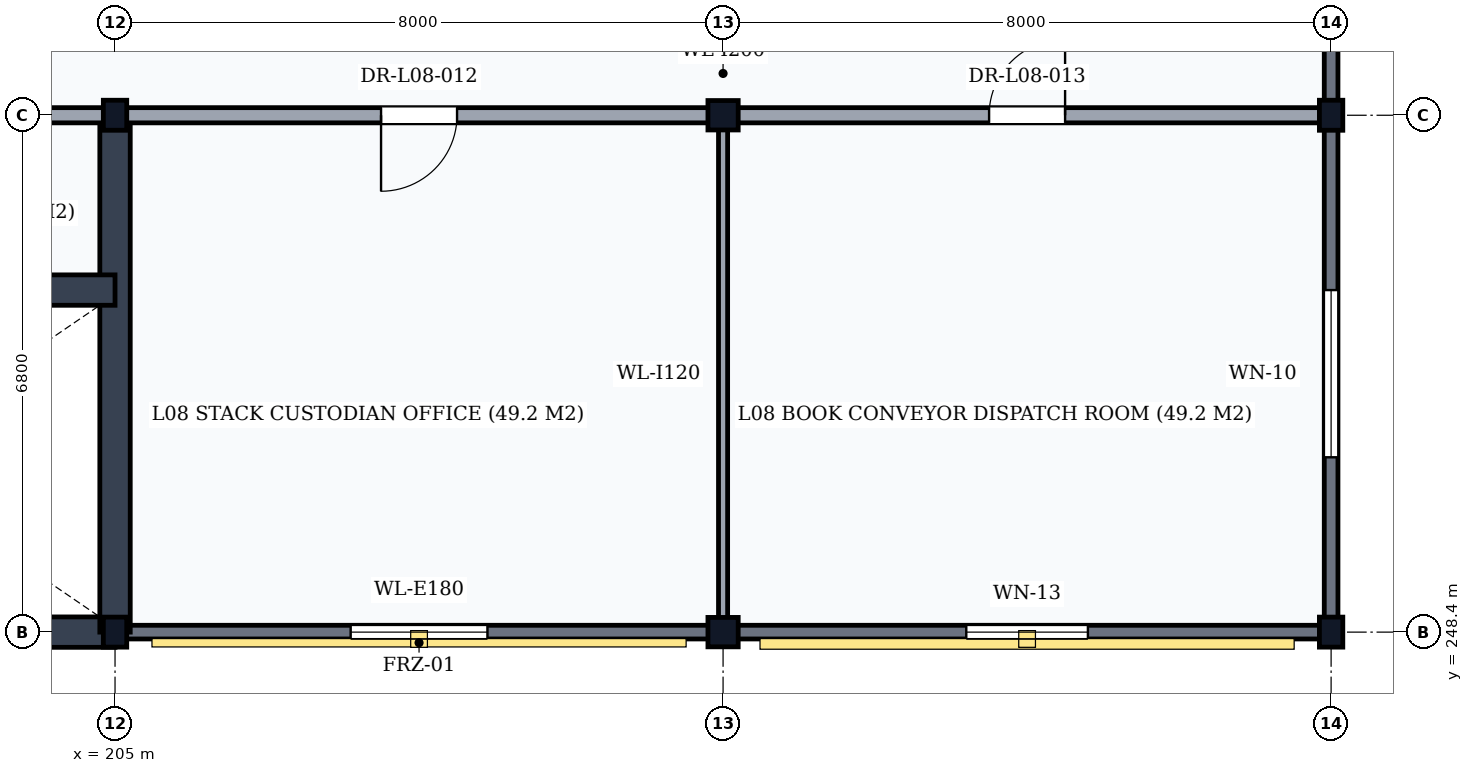
"""IFC4 building model, lengths in metres.
Left out: names, types, materials, properties, quantities, classifications, styles, units other than length and angle.
Written with IfcOpenShell. Run it as: python <this file> out.ifc"""

import sys

from ifc_helpers import new_model, si_unit, direction, frame, frame_2d, origin, origin_2d, place, context, subcontext, project, spatial, rectangle, i_section, extrude, element, fill, save


model = new_model("IFC4")
c1 = context("Model", 3, precision=1e-05, world=origin(), true_north=direction((0.0, 1.0)))
c2 = subcontext(c1, "Body", "Model", "MODEL_VIEW")
j1 = project(units=[si_unit("LENGTHUNIT", "METRE"), si_unit("PLANEANGLEUNIT", "RADIAN")], contexts=[c1])
p1 = place(None, origin())
s1 = spatial("IfcSite", under=j1, at=p1, CompositionType="ELEMENT")
p2 = place(p1, origin())
s2 = spatial("IfcBuilding", under=s1, at=p2, CompositionType="ELEMENT")
p3 = place(p2, frame((0.0, 0.0, 32.1)))
s3 = spatial("IfcBuildingStorey", under=s2, at=p3, CompositionType="ELEMENT", Elevation=32.1)
for number, where, z_axis, x_axis in (
    (1, (205.0, 248.4, 0.0), (0.0, 0.0, 1.0), (1.0, 0.0, 0.0)),
    (2, (205.0, 255.2, 0.0), (0.0, 0.0, 1.0), (1.0, 0.0, 0.0)),
):
    element("IfcColumn", number, at=place(p3, frame(where, z_axis=z_axis, x_axis=x_axis)), inside=s3, PredefinedType="COLUMN", context=c2, shape_type="SweptSolid", body=[
        extrude(i_section(OverallWidth=0.308, OverallDepth=0.395, WebThickness=0.021, FlangeThickness=0.04, FilletRadius=0.027, at=origin_2d()), origin(), (0.0, 0.0, 1.0), 3.9),
    ])
for number, where, z_axis, x_axis in (
    (3, (213.0, 248.4, 0.0), (0.0, 0.0, 1.0), (1.0, 0.0, 0.0)),
    (4, (213.0, 255.2, 0.0), (0.0, 0.0, 1.0), (1.0, 0.0, 0.0)),
):
    element("IfcColumn", number, at=place(p3, frame(where, z_axis=z_axis, x_axis=x_axis)), inside=s3, PredefinedType="COLUMN", context=c2, shape_type="SweptSolid", body=[
        extrude(i_section(OverallWidth=0.398, OverallDepth=0.387, WebThickness=0.021, FlangeThickness=0.033, FilletRadius=0.015, at=origin_2d()), origin(), (0.0, 0.0, 1.0), 3.9),
    ])
for number, where, z_axis, x_axis in (
    (5, (221.0, 248.4, 0.0), (0.0, 0.0, 1.0), (1.0, 0.0, 0.0)),
    (6, (221.0, 255.2, 0.0), (0.0, 0.0, 1.0), (1.0, 0.0, 0.0)),
):
    element("IfcColumn", number, at=place(p3, frame(where, z_axis=z_axis, x_axis=x_axis)), inside=s3, PredefinedType="COLUMN", context=c2, shape_type="SweptSolid", body=[
        extrude(i_section(OverallWidth=0.308, OverallDepth=0.395, WebThickness=0.021, FlangeThickness=0.04, FilletRadius=0.027, at=origin_2d()), origin(), (0.0, 0.0, 1.0), 3.9),
    ])
p4 = place(p3, frame((205.006, 248.4, 0.0), z_axis=(0.0, 0.0, 1.0), x_axis=(1.0, 0.0, 0.0)))
e7 = element("IfcWall", 7, at=p4, inside=s3, PredefinedType="SOLIDWALL", context=c2, shape_type="SweptSolid", body=[
    extrude(rectangle(XDim=7.988, YDim=0.18, at=frame_2d((3.994, 0.0))), origin(), (0.0, 0.0, 1.0), 3.368),
])
p5 = place(p4, frame((3.094, 0.0, 0.95)))
e8 = element("IfcOpeningElement", 8, at=p5, cuts=e7, PredefinedType="OPENING", context=c2, shape_type="SweptSolid", body=[
    extrude(rectangle(XDim=1.8, YDim=2.0, at=frame_2d((0.9, 1.0))), frame((0.0, 0.105, 0.0), z_axis=(0.0, -1.0, 0.0), x_axis=(1.0, 0.0, 0.0)), (0.0, 0.0, 1.0), 0.21),
])
p6 = place(p3, frame((213.006, 248.4, 0.0), z_axis=(0.0, 0.0, 1.0), x_axis=(1.0, 0.0, 0.0)))
e9 = element("IfcWall", 9, at=p6, inside=s3, PredefinedType="SOLIDWALL", context=c2, shape_type="SweptSolid", body=[
    extrude(rectangle(XDim=7.988, YDim=0.18, at=frame_2d((3.994, 0.0))), origin(), (0.0, 0.0, 1.0), 3.368),
])
p7 = place(p6, frame((3.194, 0.0, 0.95)))
e10 = element("IfcOpeningElement", 10, at=p7, cuts=e9, PredefinedType="OPENING", context=c2, shape_type="SweptSolid", body=[
    extrude(rectangle(XDim=1.6, YDim=2.0, at=frame_2d((0.8, 1.0))), frame((0.0, 0.105, 0.0), z_axis=(0.0, -1.0, 0.0), x_axis=(1.0, 0.0, 0.0)), (0.0, 0.0, 1.0), 0.21),
])
p8 = place(p3, frame((221.0, 248.406, 0.0), z_axis=(0.0, 0.0, 1.0), x_axis=(0.0, 1.0, 0.0)))
e11 = element("IfcWall", 11, at=p8, inside=s3, PredefinedType="SOLIDWALL", context=c2, shape_type="SweptSolid", body=[
    extrude(rectangle(XDim=6.788, YDim=0.18, at=frame_2d((3.394, 0.0))), origin(), (0.0, 0.0, 1.0), 3.448),
])
p9 = place(p8, frame((2.294, 0.0, 0.95)))
e12 = element("IfcOpeningElement", 12, at=p9, cuts=e11, PredefinedType="OPENING", context=c2, shape_type="SweptSolid", body=[
    extrude(rectangle(XDim=2.2, YDim=2.1, at=frame_2d((1.1, 1.05))), frame((0.0, 0.105, 0.0), z_axis=(0.0, -1.0, 0.0), x_axis=(1.0, 0.0, 0.0)), (0.0, 0.0, 1.0), 0.21),
])
p10 = place(p3, frame((221.0, 255.206, 0.0), z_axis=(0.0, 0.0, 1.0), x_axis=(0.0, 1.0, 0.0)))
e13 = element("IfcWall", 13, at=p10, inside=s3, PredefinedType="SOLIDWALL", context=c2, shape_type="SweptSolid", body=[
    extrude(rectangle(XDim=7.588, YDim=0.18, at=frame_2d((3.794, 0.0))), origin(), (0.0, 0.0, 1.0), 3.408),
])
p11 = place(p10, frame((4.066, 0.0, 0.95)))
e14 = element("IfcOpeningElement", 14, at=p11, cuts=e13, PredefinedType="OPENING", context=c2, shape_type="SweptSolid", body=[
    extrude(rectangle(XDim=2.0, YDim=2.1, at=frame_2d((1.0, 1.05))), frame((0.0, 0.105, 0.0), z_axis=(0.0, -1.0, 0.0), x_axis=(1.0, 0.0, 0.0)), (0.0, 0.0, 1.0), 0.21),
])
p12 = place(p3, frame((197.0, 248.4, 0.0), z_axis=(0.0, 0.0, 1.0), x_axis=(1.0, 0.0, 0.0)))
e15 = element("IfcWall", 15, at=p12, inside=s3, PredefinedType="SHEAR", context=c2, shape_type="SweptSolid", body=[
    extrude(rectangle(XDim=8.0, YDim=0.4, at=frame_2d((4.0, 0.0))), origin(), (0.0, 0.0, 1.0), 3.68),
])
p13 = place(p3, frame((205.0, 248.4, 0.0), z_axis=(0.0, 0.0, 1.0), x_axis=(0.0, 1.0, 0.0)))
e16 = element("IfcWall", 16, at=p13, inside=s3, PredefinedType="SHEAR", context=c2, shape_type="SweptSolid", body=[
    extrude(rectangle(XDim=6.8, YDim=0.4, at=frame_2d((3.4, 0.0))), origin(), (0.0, 0.0, 1.0), 3.68),
])
p14 = place(p3, frame((197.0, 252.9, 0.0), z_axis=(0.0, 0.0, 1.0), x_axis=(1.0, 0.0, 0.0)))
e17 = element("IfcWall", 17, at=p14, inside=s3, PredefinedType="SHEAR", context=c2, shape_type="SweptSolid", body=[
    extrude(rectangle(XDim=8.0, YDim=0.4, at=frame_2d((4.0, 0.0))), origin(), (0.0, 0.0, 1.0), 3.68),
])
p15 = place(p14, frame((0.3, 0.0, 0.0)))
e18 = element("IfcOpeningElement", 18, at=p15, cuts=e17, PredefinedType="OPENING", context=c2, shape_type="SweptSolid", body=[
    extrude(rectangle(XDim=1.15, YDim=2.15, at=frame_2d((0.575, 1.075))), frame((0.0, 0.215, 0.0), z_axis=(0.0, -1.0, 0.0), x_axis=(1.0, 0.0, 0.0)), (0.0, 0.0, 1.0), 0.43),
])
p16 = place(p3, frame((197.0, 255.2, 0.0), z_axis=(0.0, 0.0, 1.0), x_axis=(1.0, 0.0, 0.0)))
e19 = element("IfcWall", 19, at=p16, inside=s3, PredefinedType="PARTITIONING", context=c2, shape_type="SweptSolid", body=[
    extrude(rectangle(XDim=8.0, YDim=0.2, at=frame_2d((4.0, 0.0))), origin(), (0.0, 0.0, 1.0), 3.078),
])
p17 = place(p16, frame((3.275, 0.0, 0.0)))
e20 = element("IfcOpeningElement", 20, at=p17, cuts=e19, PredefinedType="OPENING", context=c2, shape_type="SweptSolid", body=[
    extrude(rectangle(XDim=1.45, YDim=2.2, at=frame_2d((0.725, 1.1))), frame((0.0, 0.115, 0.0), z_axis=(0.0, -1.0, 0.0), x_axis=(1.0, 0.0, 0.0)), (0.0, 0.0, 1.0), 0.23),
])
p18 = place(p3, frame((205.0, 255.2, 0.0), z_axis=(0.0, 0.0, 1.0), x_axis=(1.0, 0.0, 0.0)))
e21 = element("IfcWall", 21, at=p18, inside=s3, PredefinedType="PARTITIONING", context=c2, shape_type="SweptSolid", body=[
    extrude(rectangle(XDim=16.0, YDim=0.2, at=frame_2d((8.0, 0.0))), origin(), (0.0, 0.0, 1.0), 3.078),
])
p19 = place(p18, frame((3.5, 0.0, 0.0)))
e22 = element("IfcOpeningElement", 22, at=p19, cuts=e21, PredefinedType="OPENING", context=c2, shape_type="SweptSolid", body=[
    extrude(rectangle(XDim=1.0, YDim=2.1, at=frame_2d((0.5, 1.05))), frame((0.0, 0.115, 0.0), z_axis=(0.0, -1.0, 0.0), x_axis=(1.0, 0.0, 0.0)), (0.0, 0.0, 1.0), 0.23),
])
p20 = place(p18, frame((11.5, 0.0, 0.0)))
e23 = element("IfcOpeningElement", 23, at=p20, cuts=e21, PredefinedType="OPENING", context=c2, shape_type="SweptSolid", body=[
    extrude(rectangle(XDim=1.0, YDim=2.1, at=frame_2d((0.5, 1.05))), frame((0.0, 0.115, 0.0), z_axis=(0.0, -1.0, 0.0), x_axis=(1.0, 0.0, 0.0)), (0.0, 0.0, 1.0), 0.23),
])
p21 = place(p3, frame((213.0, 248.4, 0.0), z_axis=(0.0, 0.0, 1.0), x_axis=(0.0, 1.0, 0.0)))
e24 = element("IfcWall", 24, at=p21, inside=s3, PredefinedType="PARTITIONING", context=c2, shape_type="SweptSolid", body=[
    extrude(rectangle(XDim=6.8, YDim=0.12, at=frame_2d((3.4, 0.0))), origin(), (0.0, 0.0, 1.0), 3.228),
])
p22 = place(p5, origin())
e25 = element("IfcWindow", 25, at=p22, inside=s3, PartitioningType="DOUBLE_PANEL_VERTICAL", PredefinedType="WINDOW", context=c2, shape_type="SweptSolid", body=[
    extrude(rectangle(XDim=1.8, YDim=2.0, at=frame_2d((0.9, 1.0))), frame((0.0, 0.03, 0.0), z_axis=(0.0, -1.0, 0.0), x_axis=(1.0, 0.0, 0.0)), (0.0, 0.0, 1.0), 0.06),
])
fill(e8, e25)
p23 = place(p7, origin())
e26 = element("IfcWindow", 26, at=p23, inside=s3, PartitioningType="SINGLE_PANEL", PredefinedType="WINDOW", context=c2, shape_type="SweptSolid", body=[
    extrude(rectangle(XDim=1.6, YDim=2.0, at=frame_2d((0.8, 1.0))), frame((0.0, 0.03, 0.0), z_axis=(0.0, -1.0, 0.0), x_axis=(1.0, 0.0, 0.0)), (0.0, 0.0, 1.0), 0.06),
])
fill(e10, e26)
p24 = place(p9, origin())
e27 = element("IfcWindow", 27, at=p24, inside=s3, PartitioningType="DOUBLE_PANEL_VERTICAL", PredefinedType="WINDOW", context=c2, shape_type="SweptSolid", body=[
    extrude(rectangle(XDim=2.2, YDim=2.1, at=frame_2d((1.1, 1.05))), frame((0.0, 0.03, 0.0), z_axis=(0.0, -1.0, 0.0), x_axis=(1.0, 0.0, 0.0)), (0.0, 0.0, 1.0), 0.06),
])
fill(e12, e27)
p25 = place(p19, frame((1.0, 0.0, 0.0), z_axis=(0.0, 0.0, 1.0), x_axis=(-1.0, 0.0, 0.0)))
e28 = element("IfcDoor", 28, at=p25, inside=s3, OperationType="SINGLE_SWING_RIGHT", PredefinedType="DOOR", context=c2, shape_type="SweptSolid", body=[
    extrude(rectangle(XDim=1.0, YDim=2.1, at=frame_2d((0.5, 1.05))), frame((0.0, 0.025, 0.0), z_axis=(0.0, -1.0, 0.0), x_axis=(1.0, 0.0, 0.0)), (0.0, 0.0, 1.0), 0.05),
])
fill(e22, e28)
p26 = place(p20, frame((1.0, 0.0, 0.0), z_axis=(0.0, 0.0, 1.0), x_axis=(-1.0, 0.0, 0.0)))
e29 = element("IfcDoor", 29, at=p26, inside=s3, OperationType="SINGLE_SWING_LEFT", PredefinedType="DOOR", context=c2, shape_type="SweptSolid", body=[
    extrude(rectangle(XDim=1.0, YDim=2.1, at=frame_2d((0.5, 1.05))), frame((0.0, 0.025, 0.0), z_axis=(0.0, -1.0, 0.0), x_axis=(1.0, 0.0, 0.0)), (0.0, 0.0, 1.0), 0.05),
])
fill(e23, e29)
save(model, sys.argv[1])
